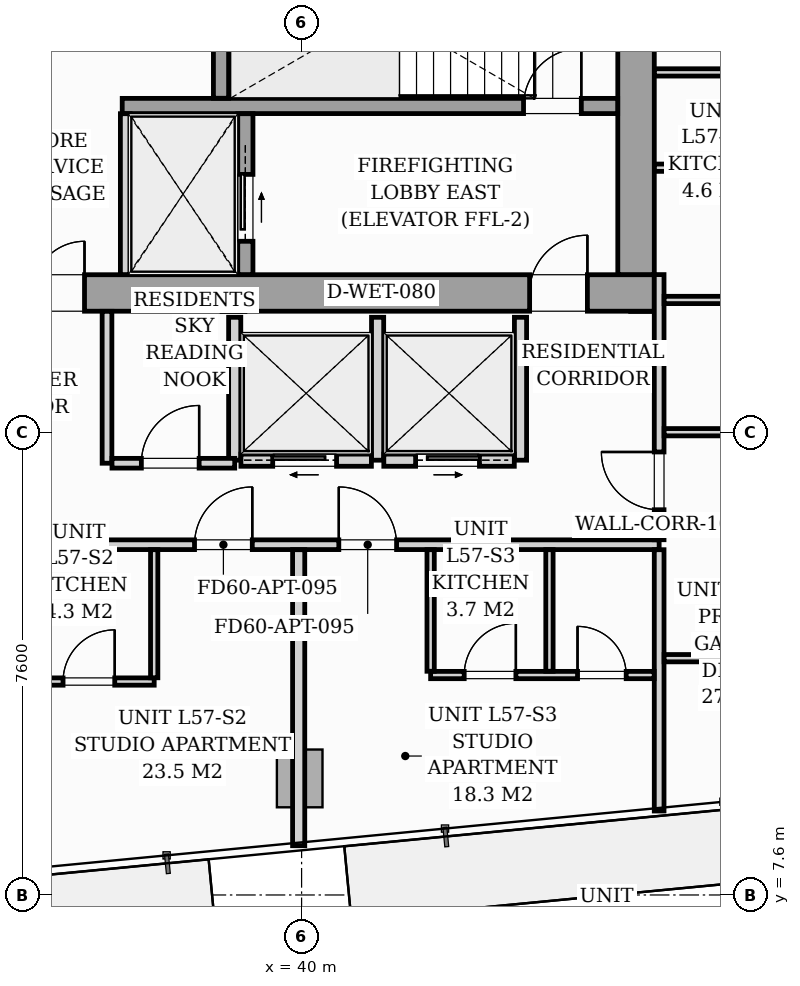
"""IFC4 building model, lengths in metres.
Left out: names, types, materials, properties, quantities, classifications, styles, units other than length and angle.
Written with IfcOpenShell. Run it as: python <this file> out.ifc"""

import sys

from ifc_helpers import new_model, si_unit, direction, frame, frame_2d, origin, origin_2d, place, context, subcontext, project, spatial, rectangle, i_section, extrude, source, transform, mapped, element, fill, save


model = new_model("IFC4")
c1 = context("Model", 3, precision=1e-05, world=origin(), true_north=direction((0.0, 1.0)))
c2 = subcontext(c1, "Body", "Model", "MODEL_VIEW")
j1 = project(units=[si_unit("LENGTHUNIT", "METRE"), si_unit("PLANEANGLEUNIT", "RADIAN")], contexts=[c1])
p1 = place(None, origin())
s1 = spatial("IfcSite", under=j1, at=p1, CompositionType="ELEMENT")
p2 = place(p1, origin())
s2 = spatial("IfcBuilding", under=s1, at=p2, CompositionType="ELEMENT")
p3 = place(p2, frame((0.0, 0.0, 198.6)))
s3 = spatial("IfcBuildingStorey", under=s2, at=p3, CompositionType="ELEMENT", Elevation=198.6)
m1 = source(origin(), c2, "Body", "SweptSolid", [
    extrude(i_section(OverallWidth=0.416, OverallDepth=0.446, WebThickness=0.039, FlangeThickness=0.063, FilletRadius=0.018, at=origin_2d()), origin(), (0.0, 0.0, 1.0), 3.196),
])
for number, where, z_axis, x_axis in (
    (1, (38.88, 17.4, 0.002), (0.0, 0.0, 1.0), (1.0, 0.0, 0.0)),
    (2, (45.6, 17.4, 0.002), (0.0, 0.0, 1.0), (1.0, 0.0, 0.0)),
):
    element("IfcColumn", number, at=place(p3, frame(where, z_axis=z_axis, x_axis=x_axis)), inside=s3, PredefinedType="PILASTER", context=c2, shape_type="MappedRepresentation", body=[
        mapped(m1, transform((0.0, 0.0, 0.0), scale=1.0)),
    ])
m2 = source(origin(), c2, "Body", "SweptSolid", [
    extrude(rectangle(XDim=0.75, YDim=0.95, at=origin_2d()), origin(), (0.0, 0.0, 1.0), 3.196),
])
p4 = place(p3, frame((39.969, 9.517, 0.002), z_axis=(0.0, 0.0, 1.0), x_axis=(0.995396198367, 0.09584575252, 0.0)))
e3 = element("IfcColumn", 3, at=p4, inside=s3, PredefinedType="COLUMN", context=c2, shape_type="MappedRepresentation", body=[
    mapped(m2, transform((0.0, 0.0, 0.0), scale=1.0)),
])
p5 = place(p3, frame((26.2, 17.5, 0.0), z_axis=(0.0, 0.0, 1.0), x_axis=(1.0, 0.0, 0.0)))
e4 = element("IfcWall", 4, at=p5, inside=s3, PredefinedType="SHEAR", context=c2, shape_type="SweptSolid", body=[
    extrude(rectangle(XDim=19.6, YDim=0.6, at=frame_2d((9.8, 0.0))), origin(), (0.0, 0.0, 1.0), 3.2),
])
p6 = place(p5, frame((0.95, 0.0, 0.0)))
e5 = element("IfcOpeningElement", 5, at=p6, cuts=e4, PredefinedType="OPENING", context=c2, shape_type="SweptSolid", body=[
    extrude(rectangle(XDim=0.95, YDim=2.06, at=frame_2d((0.475, 1.03))), frame((0.0, 0.31, 0.0), z_axis=(0.0, -1.0, 0.0), x_axis=(1.0, 0.0, 0.0)), (0.0, 0.0, 1.0), 0.62),
])
p7 = place(p5, frame((9.38, 0.0, 0.0)))
e6 = element("IfcOpeningElement", 6, at=p7, cuts=e4, PredefinedType="OPENING", context=c2, shape_type="SweptSolid", body=[
    extrude(rectangle(XDim=0.85, YDim=2.0, at=frame_2d((0.425, 1.0))), frame((0.0, 0.31, 0.0), z_axis=(0.0, -1.0, 0.0), x_axis=(1.0, 0.0, 0.0)), (0.0, 0.0, 1.0), 0.62),
])
p8 = place(p5, frame((17.55, 0.0, 0.0)))
e7 = element("IfcOpeningElement", 7, at=p8, cuts=e4, PredefinedType="OPENING", context=c2, shape_type="SweptSolid", body=[
    extrude(rectangle(XDim=0.95, YDim=2.06, at=frame_2d((0.475, 1.03))), frame((0.0, 0.31, 0.0), z_axis=(0.0, -1.0, 0.0), x_axis=(1.0, 0.0, 0.0)), (0.0, 0.0, 1.0), 0.62),
])
p9 = place(p3, frame((45.5, 17.802, 0.0), z_axis=(0.0, 0.0, 1.0), x_axis=(0.0, 1.0, 0.0)))
e8 = element("IfcWall", 8, at=p9, inside=s3, PredefinedType="SHEAR", context=c2, shape_type="SweptSolid", body=[
    extrude(rectangle(XDim=5.796, YDim=0.6, at=frame_2d((2.898, 0.0))), origin(), (0.0, 0.0, 1.0), 3.2),
])
p10 = place(p3, frame((37.05, 20.575, 0.0), z_axis=(0.0, 0.0, 1.0), x_axis=(1.0, 0.0, 0.0)))
e9 = element("IfcWall", 9, at=p10, inside=s3, PredefinedType="SOLIDWALL", context=c2, shape_type="SweptSolid", body=[
    extrude(rectangle(XDim=8.148, YDim=0.25, at=frame_2d((4.074, 0.0))), origin(), (0.0, 0.0, 1.0), 3.2),
])
p11 = place(p10, frame((6.6, 0.0, 0.0)))
e10 = element("IfcOpeningElement", 10, at=p11, cuts=e9, PredefinedType="OPENING", context=c2, shape_type="SweptSolid", body=[
    extrude(rectangle(XDim=0.95, YDim=2.06, at=frame_2d((0.475, 1.03))), frame((0.0, 0.135, 0.0), z_axis=(0.0, -1.0, 0.0), x_axis=(1.0, 0.0, 0.0)), (0.0, 0.0, 1.0), 0.27),
])
p12 = place(p3, frame((38.675, 20.702, 0.0), z_axis=(0.0, 0.0, 1.0), x_axis=(0.0, 1.0, 0.0)))
e11 = element("IfcWall", 11, at=p12, inside=s3, PredefinedType="SOLIDWALL", context=c2, shape_type="SweptSolid", body=[
    extrude(rectangle(XDim=2.896, YDim=0.25, at=frame_2d((1.448, 0.0))), origin(), (0.0, 0.0, 1.0), 3.2),
])
p13 = place(p3, frame((37.1, 17.802, 0.0), z_axis=(0.0, 0.0, 1.0), x_axis=(0.0, 1.0, 0.0)))
e12 = element("IfcWall", 12, at=p13, inside=s3, PredefinedType="PARTITIONING", context=c2, shape_type="SweptSolid", body=[
    extrude(rectangle(XDim=2.646, YDim=0.16, at=frame_2d((1.323, 0.0))), origin(), (0.0, 0.0, 1.0), 2.94),
])
p14 = place(p3, frame((39.075, 17.802, 0.0), z_axis=(0.0, 0.0, 1.0), x_axis=(0.0, 1.0, 0.0)))
e13 = element("IfcWall", 13, at=p14, inside=s3, PredefinedType="SOLIDWALL", context=c2, shape_type="SweptSolid", body=[
    extrude(rectangle(XDim=2.646, YDim=0.25, at=frame_2d((1.323, 0.0))), origin(), (0.0, 0.0, 1.0), 3.2),
])
p15 = place(p14, frame((0.548, 0.0, 0.0)))
e14 = element("IfcOpeningElement", 14, at=p15, cuts=e13, PredefinedType="OPENING", context=c2, shape_type="SweptSolid", body=[
    extrude(rectangle(XDim=1.1, YDim=2.08, at=frame_2d((0.55, 1.04))), frame((0.0, 0.135, 0.0), z_axis=(0.0, -1.0, 0.0), x_axis=(1.0, 0.0, 0.0)), (0.0, 0.0, 1.0), 0.27),
])
for number, where, z_axis, x_axis in (
    (15, (38.9, 14.75, 0.0), (0.0, 0.0, 1.0), (0.0, 1.0, 0.0)),
    (16, (41.25, 14.75, 0.0), (0.0, 0.0, 1.0), (0.0, 1.0, 0.0)),
    (17, (43.6, 14.75, 0.0), (0.0, 0.0, 1.0), (0.0, 1.0, 0.0)),
):
    element("IfcWall", number, at=place(p3, frame(where, z_axis=z_axis, x_axis=x_axis)), inside=s3, PredefinedType="PARTITIONING", context=c2, shape_type="SweptSolid", body=[
        extrude(rectangle(XDim=2.35, YDim=0.2, at=frame_2d((1.175, 0.0))), origin(), (0.0, 0.0, 1.0), 2.94),
    ])
p16 = place(p3, frame((39.002, 14.75, 0.0), z_axis=(0.0, 0.0, 1.0), x_axis=(1.0, 0.0, 0.0)))
e18 = element("IfcWall", 18, at=p16, inside=s3, PredefinedType="PARTITIONING", context=c2, shape_type="SweptSolid", body=[
    extrude(rectangle(XDim=2.146, YDim=0.2, at=frame_2d((1.073, 0.0))), origin(), (0.0, 0.0, 1.0), 2.94),
])
p17 = place(p16, frame((0.523, 0.0, 0.0)))
e19 = element("IfcOpeningElement", 19, at=p17, cuts=e18, PredefinedType="OPENING", context=c2, shape_type="SweptSolid", body=[
    extrude(rectangle(XDim=1.05, YDim=2.08, at=frame_2d((0.525, 1.04))), frame((0.0, 0.11, 0.0), z_axis=(0.0, -1.0, 0.0), x_axis=(1.0, 0.0, 0.0)), (0.0, 0.0, 1.0), 0.22),
])
p18 = place(p3, frame((41.352, 14.75, 0.0), z_axis=(0.0, 0.0, 1.0), x_axis=(1.0, 0.0, 0.0)))
e20 = element("IfcWall", 20, at=p18, inside=s3, PredefinedType="PARTITIONING", context=c2, shape_type="SweptSolid", body=[
    extrude(rectangle(XDim=2.146, YDim=0.2, at=frame_2d((1.073, 0.0))), origin(), (0.0, 0.0, 1.0), 2.94),
])
p19 = place(p18, frame((0.523, 0.0, 0.0)))
e21 = element("IfcOpeningElement", 21, at=p19, cuts=e20, PredefinedType="OPENING", context=c2, shape_type="SweptSolid", body=[
    extrude(rectangle(XDim=1.05, YDim=2.08, at=frame_2d((0.525, 1.04))), frame((0.0, 0.11, 0.0), z_axis=(0.0, -1.0, 0.0), x_axis=(1.0, 0.0, 0.0)), (0.0, 0.0, 1.0), 0.22),
])
p20 = place(p3, frame((26.12, 13.36, 0.0), z_axis=(0.0, 0.0, 1.0), x_axis=(1.0, 0.0, 0.0)))
e22 = element("IfcWall", 22, at=p20, inside=s3, PredefinedType="PARTITIONING", context=c2, shape_type="SweptSolid", body=[
    extrude(rectangle(XDim=19.76, YDim=0.16, at=frame_2d((9.88, 0.0))), origin(), (0.0, 0.0, 1.0), 2.94),
])
p21 = place(p20, frame((5.221, 0.0, 0.0)))
e23 = element("IfcOpeningElement", 23, at=p21, cuts=e22, PredefinedType="OPENING", context=c2, shape_type="SweptSolid", body=[
    extrude(rectangle(XDim=0.95, YDim=2.06, at=frame_2d((0.475, 1.03))), frame((0.0, 0.09, 0.0), z_axis=(0.0, -1.0, 0.0), x_axis=(1.0, 0.0, 0.0)), (0.0, 0.0, 1.0), 0.18),
])
p22 = place(p20, frame((12.119, 0.0, 0.0)))
e24 = element("IfcOpeningElement", 24, at=p22, cuts=e22, PredefinedType="OPENING", context=c2, shape_type="SweptSolid", body=[
    extrude(rectangle(XDim=0.95, YDim=2.06, at=frame_2d((0.475, 1.03))), frame((0.0, 0.09, 0.0), z_axis=(0.0, -1.0, 0.0), x_axis=(1.0, 0.0, 0.0)), (0.0, 0.0, 1.0), 0.18),
])
p23 = place(p20, frame((14.492, 0.0, 0.0)))
e25 = element("IfcOpeningElement", 25, at=p23, cuts=e22, PredefinedType="OPENING", context=c2, shape_type="SweptSolid", body=[
    extrude(rectangle(XDim=0.95, YDim=2.06, at=frame_2d((0.475, 1.03))), frame((0.0, 0.09, 0.0), z_axis=(0.0, -1.0, 0.0), x_axis=(1.0, 0.0, 0.0)), (0.0, 0.0, 1.0), 0.18),
])
p24 = place(p3, frame((45.88, 8.981, 0.0), z_axis=(0.0, 0.0, 1.0), x_axis=(0.0, 1.0, 0.0)))
e26 = element("IfcWall", 26, at=p24, inside=s3, PredefinedType="PARTITIONING", context=c2, shape_type="SweptSolid", body=[
    extrude(rectangle(XDim=4.297, YDim=0.16, at=frame_2d((2.148, 0.0))), origin(), (0.0, 0.0, 1.0), 2.94),
])
p25 = place(p3, frame((45.88, 13.442, 0.0), z_axis=(0.0, 0.0, 1.0), x_axis=(0.0, 1.0, 0.0)))
e27 = element("IfcWall", 27, at=p25, inside=s3, PredefinedType="PARTITIONING", context=c2, shape_type="SweptSolid", body=[
    extrude(rectangle(XDim=4.36, YDim=0.16, at=frame_2d((2.18, 0.0))), origin(), (0.0, 0.0, 1.0), 2.94),
])
p26 = place(p25, frame((0.493, 0.0, 0.0)))
e28 = element("IfcOpeningElement", 28, at=p26, cuts=e27, PredefinedType="OPENING", context=c2, shape_type="SweptSolid", body=[
    extrude(rectangle(XDim=0.95, YDim=2.06, at=frame_2d((0.475, 1.03))), frame((0.0, 0.09, 0.0), z_axis=(0.0, -1.0, 0.0), x_axis=(1.0, 0.0, 0.0)), (0.0, 0.0, 1.0), 0.18),
])
p27 = place(p3, frame((33.533, 11.11, 0.0), z_axis=(0.0, 0.0, 1.0), x_axis=(1.0, 0.0, 0.0)))
e29 = element("IfcWall", 29, at=p27, inside=s3, PredefinedType="PARTITIONING", context=c2, shape_type="SweptSolid", body=[
    extrude(rectangle(XDim=4.043, YDim=0.12, at=frame_2d((2.021, 0.0))), origin(), (0.0, 0.0, 1.0), 2.94),
])
p28 = place(p27, frame((0.546, 0.0, 0.0)))
e30 = element("IfcOpeningElement", 30, at=p28, cuts=e29, PredefinedType="OPENING", context=c2, shape_type="SweptSolid", body=[
    extrude(rectangle(XDim=0.8, YDim=2.02, at=frame_2d((0.4, 1.01))), frame((0.0, 0.07, 0.0), z_axis=(0.0, -1.0, 0.0), x_axis=(1.0, 0.0, 0.0)), (0.0, 0.0, 1.0), 0.14),
])
p29 = place(p27, frame((2.544, 0.0, 0.0)))
e31 = element("IfcOpeningElement", 31, at=p29, cuts=e29, PredefinedType="OPENING", context=c2, shape_type="SweptSolid", body=[
    extrude(rectangle(XDim=0.85, YDim=2.05, at=frame_2d((0.425, 1.025))), frame((0.0, 0.07, 0.0), z_axis=(0.0, -1.0, 0.0), x_axis=(1.0, 0.0, 0.0)), (0.0, 0.0, 1.0), 0.14),
])
p30 = place(p3, frame((37.576, 11.172, 0.0), z_axis=(0.0, 0.0, 1.0), x_axis=(0.0, 1.0, 0.0)))
e32 = element("IfcWall", 32, at=p30, inside=s3, PredefinedType="PARTITIONING", context=c2, shape_type="SweptSolid", body=[
    extrude(rectangle(XDim=2.106, YDim=0.12, at=frame_2d((1.053, 0.0))), origin(), (0.0, 0.0, 1.0), 2.94),
])
p31 = place(p3, frame((39.952, 8.41, 0.0), z_axis=(0.0, 0.0, 1.0), x_axis=(0.0, 1.0, 0.0)))
e33 = element("IfcWall", 33, at=p31, inside=s3, PredefinedType="PARTITIONING", context=c2, shape_type="SweptSolid", body=[
    extrude(rectangle(XDim=4.868, YDim=0.2, at=frame_2d((2.434, 0.0))), origin(), (0.0, 0.0, 1.0), 2.94),
])
p32 = place(p3, frame((42.122, 11.217, 0.0), z_axis=(0.0, 0.0, 1.0), x_axis=(1.0, 0.0, 0.0)))
e34 = element("IfcWall", 34, at=p32, inside=s3, PredefinedType="PARTITIONING", context=c2, shape_type="SweptSolid", body=[
    extrude(rectangle(XDim=3.676, YDim=0.12, at=frame_2d((1.838, 0.0))), origin(), (0.0, 0.0, 1.0), 2.94),
])
p33 = place(p32, frame((0.552, 0.0, 0.0)))
e35 = element("IfcOpeningElement", 35, at=p33, cuts=e34, PredefinedType="OPENING", context=c2, shape_type="SweptSolid", body=[
    extrude(rectangle(XDim=0.85, YDim=2.05, at=frame_2d((0.425, 1.025))), frame((0.0, 0.07, 0.0), z_axis=(0.0, -1.0, 0.0), x_axis=(1.0, 0.0, 0.0)), (0.0, 0.0, 1.0), 0.14),
])
p34 = place(p32, frame((2.416, 0.0, 0.0)))
e36 = element("IfcOpeningElement", 36, at=p34, cuts=e34, PredefinedType="OPENING", context=c2, shape_type="SweptSolid", body=[
    extrude(rectangle(XDim=0.8, YDim=2.02, at=frame_2d((0.4, 1.01))), frame((0.0, 0.07, 0.0), z_axis=(0.0, -1.0, 0.0), x_axis=(1.0, 0.0, 0.0)), (0.0, 0.0, 1.0), 0.14),
])
for number, where, z_axis, x_axis in (
    (37, (42.122, 11.279, 0.0), (0.0, 0.0, 1.0), (0.0, 1.0, 0.0)),
    (38, (44.076, 11.279, 0.0), (0.0, 0.0, 1.0), (0.0, 1.0, 0.0)),
):
    element("IfcWall", number, at=place(p3, frame(where, z_axis=z_axis, x_axis=x_axis)), inside=s3, PredefinedType="PARTITIONING", context=c2, shape_type="SweptSolid", body=[
        extrude(rectangle(XDim=1.999, YDim=0.12, at=frame_2d((1.0, 0.0))), origin(), (0.0, 0.0, 1.0), 2.94),
    ])
p35 = place(p3, frame((45.962, 17.385, 0.0), z_axis=(0.0, 0.0, 1.0), x_axis=(1.0, 0.0, 0.0)))
e39 = element("IfcWall", 39, at=p35, inside=s3, PredefinedType="PARTITIONING", context=c2, shape_type="SweptSolid", body=[
    extrude(rectangle(XDim=2.256, YDim=0.12, at=frame_2d((1.128, 0.0))), origin(), (0.0, 0.0, 1.0), 2.281),
])
p36 = place(p3, frame((45.962, 15.21, 0.0), z_axis=(0.0, 0.0, 1.0), x_axis=(1.0, 0.0, 0.0)))
e40 = element("IfcWall", 40, at=p36, inside=s3, PredefinedType="PARTITIONING", context=c2, shape_type="SweptSolid", body=[
    extrude(rectangle(XDim=2.256, YDim=0.12, at=frame_2d((1.128, 0.0))), origin(), (0.0, 0.0, 1.0), 2.94),
])
p37 = place(p3, frame((45.802, 19.56, 0.0), z_axis=(0.0, 0.0, 1.0), x_axis=(1.0, 0.0, 0.0)))
e41 = element("IfcWall", 41, at=p37, inside=s3, PredefinedType="PARTITIONING", context=c2, shape_type="SweptSolid", body=[
    extrude(rectangle(XDim=2.416, YDim=0.12, at=frame_2d((1.208, 0.0))), origin(), (0.0, 0.0, 1.0), 2.94),
])
p38 = place(p3, frame((45.962, 11.494, 0.0), z_axis=(0.0, 0.0, 1.0), x_axis=(1.0, 0.0, 0.0)))
e42 = element("IfcWall", 42, at=p38, inside=s3, PredefinedType="PARTITIONING", context=c2, shape_type="SweptSolid", body=[
    extrude(rectangle(XDim=16.66, YDim=0.12, at=frame_2d((8.33, 0.0))), origin(), (0.0, 0.0, 1.0), 2.382),
])
p39 = place(p38, frame((6.186, 0.0, 0.0)))
e43 = element("IfcOpeningElement", 43, at=p39, cuts=e42, PredefinedType="OPENING", context=c2, shape_type="SweptSolid", body=[
    extrude(rectangle(XDim=0.85, YDim=2.05, at=frame_2d((0.425, 1.025))), frame((0.0, 0.07, 0.0), z_axis=(0.0, -1.0, 0.0), x_axis=(1.0, 0.0, 0.0)), (0.0, 0.0, 1.0), 0.14),
])
p40 = place(p3, frame((45.802, 21.127, 0.0), z_axis=(0.0, 0.0, 1.0), x_axis=(1.0, 0.0, 0.0)))
e44 = element("IfcWall", 44, at=p40, inside=s3, PredefinedType="PARTITIONING", context=c2, shape_type="SweptSolid", body=[
    extrude(rectangle(XDim=18.586, YDim=0.12, at=frame_2d((9.293, 0.0))), origin(), (0.0, 0.0, 1.0), 2.94),
])
p41 = place(p40, frame((8.954, 0.0, 0.0)))
e45 = element("IfcOpeningElement", 45, at=p41, cuts=e44, PredefinedType="OPENING", context=c2, shape_type="SweptSolid", body=[
    extrude(rectangle(XDim=0.85, YDim=2.05, at=frame_2d((0.425, 1.025))), frame((0.0, 0.07, 0.0), z_axis=(0.0, -1.0, 0.0), x_axis=(1.0, 0.0, 0.0)), (0.0, 0.0, 1.0), 0.14),
])
p42 = place(p3, frame((36.8, 14.7, 0.0), z_axis=(0.0, 0.0, 1.0), x_axis=(0.0, 1.0, 0.0)))
e46 = element("IfcWall", 46, at=p42, inside=s3, PredefinedType="PARTITIONING", context=c2, shape_type="SweptSolid", body=[
    extrude(rectangle(XDim=2.498, YDim=0.16, at=frame_2d((1.249, 0.0))), origin(), (0.0, 0.0, 1.0), 2.94),
])
p43 = place(p3, frame((36.882, 14.7, 0.0), z_axis=(0.0, 0.0, 1.0), x_axis=(1.0, 0.0, 0.0)))
e47 = element("IfcWall", 47, at=p43, inside=s3, PredefinedType="PARTITIONING", context=c2, shape_type="SweptSolid", body=[
    extrude(rectangle(XDim=2.018, YDim=0.16, at=frame_2d((1.009, 0.0))), origin(), (0.0, 0.0, 1.0), 2.94),
])
p44 = place(p43, frame((0.483, 0.0, 0.0)))
e48 = element("IfcOpeningElement", 48, at=p44, cuts=e47, PredefinedType="OPENING", context=c2, shape_type="SweptSolid", body=[
    extrude(rectangle(XDim=0.95, YDim=2.06, at=frame_2d((0.475, 1.03))), frame((0.0, 0.09, 0.0), z_axis=(0.0, -1.0, 0.0), x_axis=(1.0, 0.0, 0.0)), (0.0, 0.0, 1.0), 0.18),
])
m3 = source(origin(), c2, "Body", "SweptSolid", [
    extrude(rectangle(XDim=0.85, YDim=2.0, at=frame_2d((0.425, 1.0))), frame((0.0, 0.025, 0.0), z_axis=(0.0, -1.0, 0.0), x_axis=(1.0, 0.0, 0.0)), (0.0, 0.0, 1.0), 0.05),
])
p45 = place(p7, origin())
e49 = element("IfcDoor", 49, at=p45, inside=s3, OperationType="SINGLE_SWING_RIGHT", PredefinedType="DOOR", context=c2, shape_type="MappedRepresentation", body=[
    mapped(m3, transform((0.0, 0.0, 0.0), scale=1.0)),
])
fill(e6, e49)
m4 = source(origin(), c2, "Body", "SweptSolid", [
    extrude(rectangle(XDim=0.95, YDim=2.06, at=frame_2d((0.475, 1.03))), frame((0.0, 0.025, 0.0), z_axis=(0.0, -1.0, 0.0), x_axis=(1.0, 0.0, 0.0)), (0.0, 0.0, 1.0), 0.05),
])
p46 = place(p8, origin())
e50 = element("IfcDoor", 50, at=p46, inside=s3, OperationType="SINGLE_SWING_RIGHT", PredefinedType="DOOR", context=c2, shape_type="MappedRepresentation", body=[
    mapped(m4, transform((0.0, 0.0, 0.0), scale=1.0)),
])
fill(e7, e50)
p47 = place(p11, origin())
e51 = element("IfcDoor", 51, at=p47, inside=s3, OperationType="SINGLE_SWING_RIGHT", PredefinedType="DOOR", context=c2, shape_type="MappedRepresentation", body=[
    mapped(m4, transform((0.0, 0.0, 0.0), scale=1.0)),
])
fill(e10, e51)
m5 = source(origin(), c2, "Body", "SweptSolid", [
    extrude(rectangle(XDim=1.1, YDim=2.08, at=frame_2d((0.55, 1.04))), frame((0.0, 0.025, 0.0), z_axis=(0.0, -1.0, 0.0), x_axis=(1.0, 0.0, 0.0)), (0.0, 0.0, 1.0), 0.05),
])
p48 = place(p15, origin())
e52 = element("IfcDoor", 52, at=p48, inside=s3, OperationType="SLIDING_TO_RIGHT", PredefinedType="DOOR", context=c2, shape_type="MappedRepresentation", body=[
    mapped(m5, transform((0.0, 0.0, 0.0), scale=1.0)),
])
fill(e14, e52)
m6 = source(origin(), c2, "Body", "SweptSolid", [
    extrude(rectangle(XDim=1.05, YDim=2.08, at=frame_2d((0.525, 1.04))), frame((0.0, 0.025, 0.0), z_axis=(0.0, -1.0, 0.0), x_axis=(1.0, 0.0, 0.0)), (0.0, 0.0, 1.0), 0.05),
])
p49 = place(p17, origin())
e53 = element("IfcDoor", 53, at=p49, inside=s3, OperationType="SLIDING_TO_LEFT", PredefinedType="DOOR", context=c2, shape_type="MappedRepresentation", body=[
    mapped(m6, transform((0.0, 0.0, 0.0), scale=1.0)),
])
fill(e19, e53)
p50 = place(p19, origin())
e54 = element("IfcDoor", 54, at=p50, inside=s3, OperationType="SLIDING_TO_RIGHT", PredefinedType="DOOR", context=c2, shape_type="MappedRepresentation", body=[
    mapped(m6, transform((0.0, 0.0, 0.0), scale=1.0)),
])
fill(e21, e54)
m7 = source(origin(), c2, "Body", "SweptSolid", [
    extrude(rectangle(XDim=0.95, YDim=2.06, at=frame_2d((0.475, 1.03))), frame((0.0, 0.025, 0.0), z_axis=(0.0, -1.0, 0.0), x_axis=(1.0, 0.0, 0.0)), (0.0, 0.0, 1.0), 0.05),
])
p51 = place(p22, origin())
e55 = element("IfcDoor", 55, at=p51, inside=s3, OperationType="SINGLE_SWING_RIGHT", PredefinedType="DOOR", context=c2, shape_type="MappedRepresentation", body=[
    mapped(m7, transform((0.0, 0.0, 0.0), scale=1.0)),
])
fill(e24, e55)
m8 = source(origin(), c2, "Body", "SweptSolid", [
    extrude(rectangle(XDim=0.85, YDim=2.05, at=frame_2d((0.425, 1.025))), frame((0.0, 0.025, 0.0), z_axis=(0.0, -1.0, 0.0), x_axis=(1.0, 0.0, 0.0)), (0.0, 0.0, 1.0), 0.05),
])
p52 = place(p29, origin())
e56 = element("IfcDoor", 56, at=p52, inside=s3, OperationType="SINGLE_SWING_RIGHT", PredefinedType="DOOR", context=c2, shape_type="MappedRepresentation", body=[
    mapped(m8, transform((0.0, 0.0, 0.0), scale=1.0)),
])
fill(e31, e56)
p53 = place(p23, origin())
e57 = element("IfcDoor", 57, at=p53, inside=s3, OperationType="SINGLE_SWING_LEFT", PredefinedType="DOOR", context=c2, shape_type="MappedRepresentation", body=[
    mapped(m7, transform((0.0, 0.0, 0.0), scale=1.0)),
])
fill(e25, e57)
p54 = place(p33, origin())
e58 = element("IfcDoor", 58, at=p54, inside=s3, OperationType="SINGLE_SWING_RIGHT", PredefinedType="DOOR", context=c2, shape_type="MappedRepresentation", body=[
    mapped(m8, transform((0.0, 0.0, 0.0), scale=1.0)),
])
fill(e35, e58)
m9 = source(origin(), c2, "Body", "SweptSolid", [
    extrude(rectangle(XDim=0.8, YDim=2.02, at=frame_2d((0.4, 1.01))), frame((0.0, 0.025, 0.0), z_axis=(0.0, -1.0, 0.0), x_axis=(1.0, 0.0, 0.0)), (0.0, 0.0, 1.0), 0.05),
])
p55 = place(p34, origin())
e59 = element("IfcDoor", 59, at=p55, inside=s3, OperationType="SINGLE_SWING_LEFT", PredefinedType="DOOR", context=c2, shape_type="MappedRepresentation", body=[
    mapped(m9, transform((0.0, 0.0, 0.0), scale=1.0)),
])
fill(e36, e59)
p56 = place(p26, origin())
e60 = element("IfcDoor", 60, at=p56, inside=s3, OperationType="SINGLE_SWING_RIGHT", PredefinedType="DOOR", context=c2, shape_type="MappedRepresentation", body=[
    mapped(m7, transform((0.0, 0.0, 0.0), scale=1.0)),
])
fill(e28, e60)
p57 = place(p44, origin())
e61 = element("IfcDoor", 61, at=p57, inside=s3, OperationType="SINGLE_SWING_RIGHT", PredefinedType="DOOR", context=c2, shape_type="MappedRepresentation", body=[
    mapped(m7, transform((0.0, 0.0, 0.0), scale=1.0)),
])
fill(e48, e61)
save(model, sys.argv[1])
